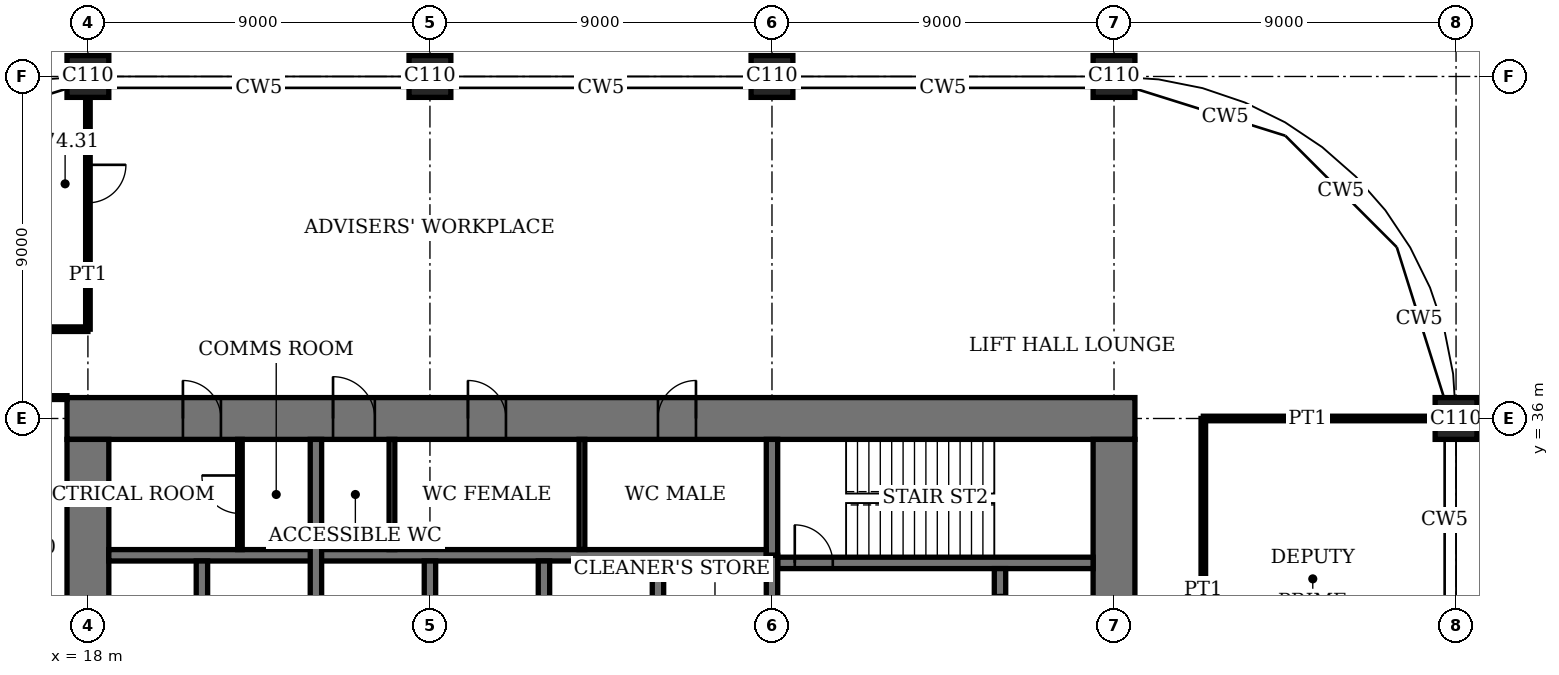
"""IFC4 building model, lengths in metres.
Left out: names, types, materials, properties, quantities, classifications, styles, units other than length and angle.
Written with IfcOpenShell. Run it as: python <this file> out.ifc"""

import sys

from ifc_helpers import new_model, si_unit, direction, frame, frame_2d, origin, origin_2d, place, context, subcontext, project, spatial, rectangle, extrude, element, fill, save


model = new_model("IFC4")
c1 = context("Model", 3, precision=1e-05, world=origin(), true_north=direction((0.0, 1.0)))
c2 = subcontext(c1, "Body", "Model", "MODEL_VIEW")
j1 = project(units=[si_unit("LENGTHUNIT", "METRE"), si_unit("PLANEANGLEUNIT", "RADIAN")], contexts=[c1])
p1 = place(None, origin())
s1 = spatial("IfcSite", under=j1, at=p1, CompositionType="ELEMENT")
p2 = place(p1, origin())
s2 = spatial("IfcBuilding", under=s1, at=p2, CompositionType="ELEMENT")
p3 = place(p2, frame((0.0, 0.0, 303.4)))
s3 = spatial("IfcBuildingStorey", under=s2, at=p3, CompositionType="ELEMENT", Elevation=303.4)
for number, where, z_axis, x_axis in (
    (1, (18.0, 45.0, 0.0), (0.0, 0.0, 1.0), (1.0, 0.0, 0.0)),
    (2, (27.0, 45.0, 0.0), (0.0, 0.0, 1.0), (1.0, 0.0, 0.0)),
    (3, (36.0, 45.0, 0.0), (0.0, 0.0, 1.0), (1.0, 0.0, 0.0)),
    (4, (45.0, 45.0, 0.0), (0.0, 0.0, 1.0), (1.0, 0.0, 0.0)),
    (5, (54.0, 36.0, 0.0), (0.0, 0.0, 1.0), (1.0, 0.0, 0.0)),
):
    element("IfcColumn", number, at=place(p3, frame(where, z_axis=z_axis, x_axis=x_axis)), inside=s3, PredefinedType="COLUMN", context=c2, shape_type="SweptSolid", body=[
        extrude(rectangle(XDim=1.1, YDim=1.1, at=origin_2d()), origin(), (0.0, 0.0, 1.0), 4.0),
    ])
p4 = place(p3, frame((45.55, 36.0, 0.0), z_axis=(0.0, 0.0, 1.0), x_axis=(-1.0, 0.0, 0.0)))
e6 = element("IfcWall", 6, at=p4, inside=s3, PredefinedType="SHEAR", context=c2, shape_type="SweptSolid", body=[
    extrude(rectangle(XDim=28.1, YDim=1.1, at=frame_2d((14.05, 0.0))), origin(), (0.0, 0.0, 1.0), 4.0),
])
p5 = place(p4, frame((11.55, 0.0, 0.0)))
e7 = element("IfcOpeningElement", 7, at=p5, cuts=e6, PredefinedType="OPENING", context=c2, shape_type="SweptSolid", body=[
    extrude(rectangle(XDim=1.0, YDim=2.4, at=frame_2d((0.5, 1.2))), frame((0.0, 0.56, 0.0), z_axis=(0.0, -1.0, 0.0), x_axis=(1.0, 0.0, 0.0)), (0.0, 0.0, 1.0), 1.12),
])
p6 = place(p4, frame((16.55, 0.0, 0.0)))
e8 = element("IfcOpeningElement", 8, at=p6, cuts=e6, PredefinedType="OPENING", context=c2, shape_type="SweptSolid", body=[
    extrude(rectangle(XDim=1.0, YDim=2.4, at=frame_2d((0.5, 1.2))), frame((0.0, 0.56, 0.0), z_axis=(0.0, -1.0, 0.0), x_axis=(1.0, 0.0, 0.0)), (0.0, 0.0, 1.0), 1.12),
])
p7 = place(p4, frame((20.0, 0.0, 0.0)))
e9 = element("IfcOpeningElement", 9, at=p7, cuts=e6, PredefinedType="OPENING", context=c2, shape_type="SweptSolid", body=[
    extrude(rectangle(XDim=1.1, YDim=2.4, at=frame_2d((0.55, 1.2))), frame((0.0, 0.56, 0.0), z_axis=(0.0, -1.0, 0.0), x_axis=(1.0, 0.0, 0.0)), (0.0, 0.0, 1.0), 1.12),
])
p8 = place(p4, frame((24.05, 0.0, 0.0)))
e10 = element("IfcOpeningElement", 10, at=p8, cuts=e6, PredefinedType="OPENING", context=c2, shape_type="SweptSolid", body=[
    extrude(rectangle(XDim=1.0, YDim=2.4, at=frame_2d((0.5, 1.2))), frame((0.0, 0.56, 0.0), z_axis=(0.0, -1.0, 0.0), x_axis=(1.0, 0.0, 0.0)), (0.0, 0.0, 1.0), 1.12),
])
p9 = place(p3, frame((18.0, 35.45, 0.0), z_axis=(0.0, 0.0, 1.0), x_axis=(0.0, -1.0, 0.0)))
e11 = element("IfcWall", 11, at=p9, inside=s3, PredefinedType="SHEAR", context=c2, shape_type="SweptSolid", body=[
    extrude(rectangle(XDim=16.9, YDim=1.1, at=frame_2d((8.45, 0.0))), origin(), (0.0, 0.0, 1.0), 4.0),
])
p10 = place(p9, frame((8.45, 0.0, 0.0)))
e12 = element("IfcOpeningElement", 12, at=p10, cuts=e11, PredefinedType="OPENING", context=c2, shape_type="SweptSolid", body=[
    extrude(rectangle(XDim=1.8, YDim=2.4, at=frame_2d((0.9, 1.2))), frame((0.0, 0.56, 0.0), z_axis=(0.0, -1.0, 0.0), x_axis=(1.0, 0.0, 0.0)), (0.0, 0.0, 1.0), 1.12),
])
p11 = place(p3, frame((45.0, 18.55, 0.0), z_axis=(0.0, 0.0, 1.0), x_axis=(0.0, 1.0, 0.0)))
e13 = element("IfcWall", 13, at=p11, inside=s3, PredefinedType="SHEAR", context=c2, shape_type="SweptSolid", body=[
    extrude(rectangle(XDim=16.9, YDim=1.1, at=frame_2d((8.45, 0.0))), origin(), (0.0, 0.0, 1.0), 4.0),
])
p12 = place(p11, frame((8.45, 0.0, 0.0)))
e14 = element("IfcOpeningElement", 14, at=p12, cuts=e13, PredefinedType="OPENING", context=c2, shape_type="SweptSolid", body=[
    extrude(rectangle(XDim=1.8, YDim=2.4, at=frame_2d((0.9, 1.2))), frame((0.0, 0.56, 0.0), z_axis=(0.0, -1.0, 0.0), x_axis=(1.0, 0.0, 0.0)), (0.0, 0.0, 1.0), 1.12),
])
p13 = place(p3, frame((36.15, 32.2, 0.0), z_axis=(0.0, 0.0, 1.0), x_axis=(1.0, 0.0, 0.0)))
e15 = element("IfcWall", 15, at=p13, inside=s3, PredefinedType="SHEAR", context=c2, shape_type="SweptSolid", body=[
    extrude(rectangle(XDim=8.3, YDim=0.3, at=frame_2d((4.15, 0.0))), origin(), (0.0, 0.0, 1.0), 4.0),
])
p14 = place(p13, frame((0.45, 0.0, 0.0)))
e16 = element("IfcOpeningElement", 16, at=p14, cuts=e15, PredefinedType="OPENING", context=c2, shape_type="SweptSolid", body=[
    extrude(rectangle(XDim=1.0, YDim=2.4, at=frame_2d((0.5, 1.2))), frame((0.0, 0.16, 0.0), z_axis=(0.0, -1.0, 0.0), x_axis=(1.0, 0.0, 0.0)), (0.0, 0.0, 1.0), 0.32),
])
p15 = place(p3, frame((36.0, 32.4, 0.0), z_axis=(0.0, 0.0, 1.0), x_axis=(0.0, 1.0, 0.0)))
e17 = element("IfcWall", 17, at=p15, inside=s3, PredefinedType="SHEAR", context=c2, shape_type="SweptSolid", body=[
    extrude(rectangle(XDim=3.05, YDim=0.3, at=frame_2d((1.525, 0.0))), origin(), (0.0, 0.0, 1.0), 4.0),
])
p16 = place(p3, frame((42.0, 29.55, 0.0), z_axis=(0.0, 0.0, 1.0), x_axis=(0.0, 1.0, 0.0)))
e18 = element("IfcWall", 18, at=p16, inside=s3, PredefinedType="SHEAR", context=c2, shape_type="SweptSolid", body=[
    extrude(rectangle(XDim=2.5, YDim=0.3, at=frame_2d((1.25, 0.0))), origin(), (0.0, 0.0, 1.0), 4.0),
])
p17 = place(p16, frame((0.7, 0.0, 0.0)))
e19 = element("IfcOpeningElement", 19, at=p17, cuts=e18, PredefinedType="OPENING", context=c2, shape_type="SweptSolid", body=[
    extrude(rectangle(XDim=1.1, YDim=2.4, at=frame_2d((0.55, 1.2))), frame((0.0, 0.16, 0.0), z_axis=(0.0, -1.0, 0.0), x_axis=(1.0, 0.0, 0.0)), (0.0, 0.0, 1.0), 0.32),
])
p18 = place(p3, frame((18.55, 32.4, 0.0), z_axis=(0.0, 0.0, 1.0), x_axis=(1.0, 0.0, 0.0)))
e20 = element("IfcWall", 20, at=p18, inside=s3, PredefinedType="SHEAR", context=c2, shape_type="SweptSolid", body=[
    extrude(rectangle(XDim=17.3, YDim=0.3, at=frame_2d((8.65, 0.0))), origin(), (0.0, 0.0, 1.0), 4.0),
])
for number, where, z_axis, x_axis in (
    (21, (33.0, 29.55, 0.0), (0.0, 0.0, 1.0), (0.0, 1.0, 0.0)),
    (22, (30.0, 29.55, 0.0), (0.0, 0.0, 1.0), (0.0, 1.0, 0.0)),
    (23, (27.0, 29.55, 0.0), (0.0, 0.0, 1.0), (0.0, 1.0, 0.0)),
):
    element("IfcWall", number, at=place(p3, frame(where, z_axis=z_axis, x_axis=x_axis)), inside=s3, PredefinedType="SHEAR", context=c2, shape_type="SweptSolid", body=[
        extrude(rectangle(XDim=2.7, YDim=0.3, at=frame_2d((1.35, 0.0))), origin(), (0.0, 0.0, 1.0), 4.0),
    ])
p19 = place(p3, frame((24.0, 29.55, 0.0), z_axis=(0.0, 0.0, 1.0), x_axis=(0.0, 1.0, 0.0)))
e24 = element("IfcWall", 24, at=p19, inside=s3, PredefinedType="SHEAR", context=c2, shape_type="SweptSolid", body=[
    extrude(rectangle(XDim=5.9, YDim=0.3, at=frame_2d((2.95, 0.0))), origin(), (0.0, 0.0, 1.0), 4.0),
])
p20 = place(p3, frame((21.0, 29.55, 0.0), z_axis=(0.0, 0.0, 1.0), x_axis=(0.0, 1.0, 0.0)))
e25 = element("IfcWall", 25, at=p20, inside=s3, PredefinedType="SHEAR", context=c2, shape_type="SweptSolid", body=[
    extrude(rectangle(XDim=2.7, YDim=0.3, at=frame_2d((1.35, 0.0))), origin(), (0.0, 0.0, 1.0), 4.0),
])
p21 = place(p3, frame((36.0, 29.55, 0.0), z_axis=(0.0, 0.0, 1.0), x_axis=(0.0, 1.0, 0.0)))
e26 = element("IfcWall", 26, at=p21, inside=s3, PredefinedType="SHEAR", context=c2, shape_type="SweptSolid", body=[
    extrude(rectangle(XDim=2.85, YDim=0.3, at=frame_2d((1.425, 0.0))), origin(), (0.0, 0.0, 1.0), 4.0),
])
p22 = place(p3, frame((47.35, 36.0, 0.0), z_axis=(0.0, 0.0, 1.0), x_axis=(1.0, 0.0, 0.0)))
e27 = element("IfcWall", 27, at=p22, inside=s3, PredefinedType="PARTITIONING", context=c2, shape_type="SweptSolid", body=[
    extrude(rectangle(XDim=6.1, YDim=0.12, at=frame_2d((3.05, 0.0))), origin(), (0.0, 0.0, 1.0), 3.05),
])
p23 = place(p3, frame((9.55, 36.55, 0.0), z_axis=(0.0, 0.0, 1.0), x_axis=(1.0, 0.0, 0.0)))
e28 = element("IfcWall", 28, at=p23, inside=s3, PredefinedType="PARTITIONING", context=c2, shape_type="SweptSolid", body=[
    extrude(rectangle(XDim=7.9, YDim=0.1, at=frame_2d((3.95, 0.0))), origin(), (0.0, 0.0, 1.0), 3.75),
])
p24 = place(p3, frame((9.918, 38.35, 0.0), z_axis=(0.0, 0.0, 1.0), x_axis=(1.0, 0.0, 0.0)))
e29 = element("IfcWall", 29, at=p24, inside=s3, PredefinedType="PARTITIONING", context=c2, shape_type="SweptSolid", body=[
    extrude(rectangle(XDim=8.082, YDim=0.12, at=frame_2d((4.041, 0.0))), origin(), (0.0, 0.0, 1.0), 3.75),
])
p25 = place(p3, frame((18.0, 38.35, 0.0), z_axis=(0.0, 0.0, 1.0), x_axis=(0.0, 1.0, 0.0)))
e30 = element("IfcWall", 30, at=p25, inside=s3, PredefinedType="PARTITIONING", context=c2, shape_type="SweptSolid", body=[
    extrude(rectangle(XDim=6.1, YDim=0.12, at=frame_2d((3.05, 0.0))), origin(), (0.0, 0.0, 1.0), 3.05),
])
p26 = place(p25, frame((3.325, 0.0, 0.0)))
e31 = element("IfcOpeningElement", 31, at=p26, cuts=e30, PredefinedType="OPENING", context=c2, shape_type="SweptSolid", body=[
    extrude(rectangle(XDim=1.0, YDim=2.4, at=frame_2d((0.5, 1.2))), frame((0.0, 0.07, 0.0), z_axis=(0.0, -1.0, 0.0), x_axis=(1.0, 0.0, 0.0)), (0.0, 0.0, 1.0), 0.14),
])
p27 = place(p3, frame((47.35, 27.0, 0.0), z_axis=(0.0, 0.0, 1.0), x_axis=(0.0, 1.0, 0.0)))
e32 = element("IfcWall", 32, at=p27, inside=s3, PredefinedType="PARTITIONING", context=c2, shape_type="SweptSolid", body=[
    extrude(rectangle(XDim=9.0, YDim=0.12, at=frame_2d((4.5, 0.0))), origin(), (0.0, 0.0, 1.0), 3.75),
])
for number, where, z_axis, x_axis in (
    (33, (31.0, 32.55, 0.0), (0.0, 0.0, 1.0), (0.0, 1.0, 0.0)),
    (34, (26.0, 32.55, 0.0), (0.0, 0.0, 1.0), (0.0, 1.0, 0.0)),
):
    element("IfcWall", number, at=place(p3, frame(where, z_axis=z_axis, x_axis=x_axis)), inside=s3, PredefinedType="PARTITIONING", context=c2, shape_type="SweptSolid", body=[
        extrude(rectangle(XDim=2.9, YDim=0.15, at=frame_2d((1.45, 0.0))), origin(), (0.0, 0.0, 1.0), 3.75),
    ])
p28 = place(p3, frame((22.0, 32.55, 0.0), z_axis=(0.0, 0.0, 1.0), x_axis=(0.0, 1.0, 0.0)))
e35 = element("IfcWall", 35, at=p28, inside=s3, PredefinedType="PARTITIONING", context=c2, shape_type="SweptSolid", body=[
    extrude(rectangle(XDim=2.9, YDim=0.12, at=frame_2d((1.45, 0.0))), origin(), (0.0, 0.0, 1.0), 3.75),
])
p29 = place(p28, frame((0.95, 0.0, 0.0)))
e36 = element("IfcOpeningElement", 36, at=p29, cuts=e35, PredefinedType="OPENING", context=c2, shape_type="SweptSolid", body=[
    extrude(rectangle(XDim=1.0, YDim=2.4, at=frame_2d((0.5, 1.2))), frame((0.0, 0.07, 0.0), z_axis=(0.0, -1.0, 0.0), x_axis=(1.0, 0.0, 0.0)), (0.0, 0.0, 1.0), 0.14),
])
p30 = place(p5, origin())
e37 = element("IfcDoor", 37, at=p30, inside=s3, OperationType="SINGLE_SWING_LEFT", PredefinedType="DOOR", context=c2, shape_type="SweptSolid", body=[
    extrude(rectangle(XDim=1.0, YDim=2.4, at=frame_2d((0.5, 1.2))), frame((0.0, 0.025, 0.0), z_axis=(0.0, -1.0, 0.0), x_axis=(1.0, 0.0, 0.0)), (0.0, 0.0, 1.0), 0.05),
    extrude(rectangle(XDim=0.04, YDim=2.4, at=frame_2d((0.02, 1.2))), frame((0.0, 0.4, 0.0), z_axis=(0.0, -1.0, 0.0), x_axis=(1.0, 0.0, 0.0)), (0.0, 0.0, 1.0), 0.8),
    extrude(rectangle(XDim=0.04, YDim=2.4, at=frame_2d((0.98, 1.2))), frame((0.0, 0.4, 0.0), z_axis=(0.0, -1.0, 0.0), x_axis=(1.0, 0.0, 0.0)), (0.0, 0.0, 1.0), 0.8),
    extrude(rectangle(XDim=1.0, YDim=0.04, at=frame_2d((0.5, 2.38))), frame((0.0, 0.4, 0.0), z_axis=(0.0, -1.0, 0.0), x_axis=(1.0, 0.0, 0.0)), (0.0, 0.0, 1.0), 0.8),
])
fill(e7, e37)
p31 = place(p6, origin())
e38 = element("IfcDoor", 38, at=p31, inside=s3, OperationType="SINGLE_SWING_RIGHT", PredefinedType="DOOR", context=c2, shape_type="SweptSolid", body=[
    extrude(rectangle(XDim=1.0, YDim=2.4, at=frame_2d((0.5, 1.2))), frame((0.0, 0.025, 0.0), z_axis=(0.0, -1.0, 0.0), x_axis=(1.0, 0.0, 0.0)), (0.0, 0.0, 1.0), 0.05),
    extrude(rectangle(XDim=0.04, YDim=2.4, at=frame_2d((0.02, 1.2))), frame((0.0, 0.4, 0.0), z_axis=(0.0, -1.0, 0.0), x_axis=(1.0, 0.0, 0.0)), (0.0, 0.0, 1.0), 0.8),
    extrude(rectangle(XDim=0.04, YDim=2.4, at=frame_2d((0.98, 1.2))), frame((0.0, 0.4, 0.0), z_axis=(0.0, -1.0, 0.0), x_axis=(1.0, 0.0, 0.0)), (0.0, 0.0, 1.0), 0.8),
    extrude(rectangle(XDim=1.0, YDim=0.04, at=frame_2d((0.5, 2.38))), frame((0.0, 0.4, 0.0), z_axis=(0.0, -1.0, 0.0), x_axis=(1.0, 0.0, 0.0)), (0.0, 0.0, 1.0), 0.8),
])
fill(e8, e38)
p32 = place(p7, origin())
e39 = element("IfcDoor", 39, at=p32, inside=s3, OperationType="SINGLE_SWING_RIGHT", PredefinedType="DOOR", context=c2, shape_type="SweptSolid", body=[
    extrude(rectangle(XDim=1.1, YDim=2.4, at=frame_2d((0.55, 1.2))), frame((0.0, 0.025, 0.0), z_axis=(0.0, -1.0, 0.0), x_axis=(1.0, 0.0, 0.0)), (0.0, 0.0, 1.0), 0.05),
    extrude(rectangle(XDim=0.04, YDim=2.4, at=frame_2d((0.02, 1.2))), frame((0.0, 0.44, 0.0), z_axis=(0.0, -1.0, 0.0), x_axis=(1.0, 0.0, 0.0)), (0.0, 0.0, 1.0), 0.88),
    extrude(rectangle(XDim=0.04, YDim=2.4, at=frame_2d((1.08, 1.2))), frame((0.0, 0.44, 0.0), z_axis=(0.0, -1.0, 0.0), x_axis=(1.0, 0.0, 0.0)), (0.0, 0.0, 1.0), 0.88),
    extrude(rectangle(XDim=1.1, YDim=0.04, at=frame_2d((0.55, 2.38))), frame((0.0, 0.44, 0.0), z_axis=(0.0, -1.0, 0.0), x_axis=(1.0, 0.0, 0.0)), (0.0, 0.0, 1.0), 0.88),
])
fill(e9, e39)
p33 = place(p8, origin())
e40 = element("IfcDoor", 40, at=p33, inside=s3, OperationType="SINGLE_SWING_RIGHT", PredefinedType="DOOR", context=c2, shape_type="SweptSolid", body=[
    extrude(rectangle(XDim=1.0, YDim=2.4, at=frame_2d((0.5, 1.2))), frame((0.0, 0.025, 0.0), z_axis=(0.0, -1.0, 0.0), x_axis=(1.0, 0.0, 0.0)), (0.0, 0.0, 1.0), 0.05),
    extrude(rectangle(XDim=0.04, YDim=2.4, at=frame_2d((0.02, 1.2))), frame((0.0, 0.4, 0.0), z_axis=(0.0, -1.0, 0.0), x_axis=(1.0, 0.0, 0.0)), (0.0, 0.0, 1.0), 0.8),
    extrude(rectangle(XDim=0.04, YDim=2.4, at=frame_2d((0.98, 1.2))), frame((0.0, 0.4, 0.0), z_axis=(0.0, -1.0, 0.0), x_axis=(1.0, 0.0, 0.0)), (0.0, 0.0, 1.0), 0.8),
    extrude(rectangle(XDim=1.0, YDim=0.04, at=frame_2d((0.5, 2.38))), frame((0.0, 0.4, 0.0), z_axis=(0.0, -1.0, 0.0), x_axis=(1.0, 0.0, 0.0)), (0.0, 0.0, 1.0), 0.8),
])
fill(e10, e40)
p34 = place(p14, origin())
e41 = element("IfcDoor", 41, at=p34, inside=s3, OperationType="SINGLE_SWING_RIGHT", PredefinedType="DOOR", context=c2, shape_type="SweptSolid", body=[
    extrude(rectangle(XDim=1.0, YDim=2.4, at=frame_2d((0.5, 1.2))), frame((0.0, 0.03, 0.0), z_axis=(0.0, -1.0, 0.0), x_axis=(1.0, 0.0, 0.0)), (0.0, 0.0, 1.0), 0.06),
])
fill(e16, e41)
p35 = place(p26, origin())
e42 = element("IfcDoor", 42, at=p35, inside=s3, OperationType="SINGLE_SWING_RIGHT", PredefinedType="DOOR", context=c2, shape_type="SweptSolid", body=[
    extrude(rectangle(XDim=1.0, YDim=2.4, at=frame_2d((0.5, 1.2))), frame((0.0, 0.025, 0.0), z_axis=(0.0, -1.0, 0.0), x_axis=(1.0, 0.0, 0.0)), (0.0, 0.0, 1.0), 0.05),
])
fill(e31, e42)
p36 = place(p29, origin())
e43 = element("IfcDoor", 43, at=p36, inside=s3, OperationType="SINGLE_SWING_LEFT", PredefinedType="DOOR", context=c2, shape_type="SweptSolid", body=[
    extrude(rectangle(XDim=1.0, YDim=2.4, at=frame_2d((0.5, 1.2))), frame((0.0, 0.03, 0.0), z_axis=(0.0, -1.0, 0.0), x_axis=(1.0, 0.0, 0.0)), (0.0, 0.0, 1.0), 0.06),
])
fill(e36, e43)
save(model, sys.argv[1])
